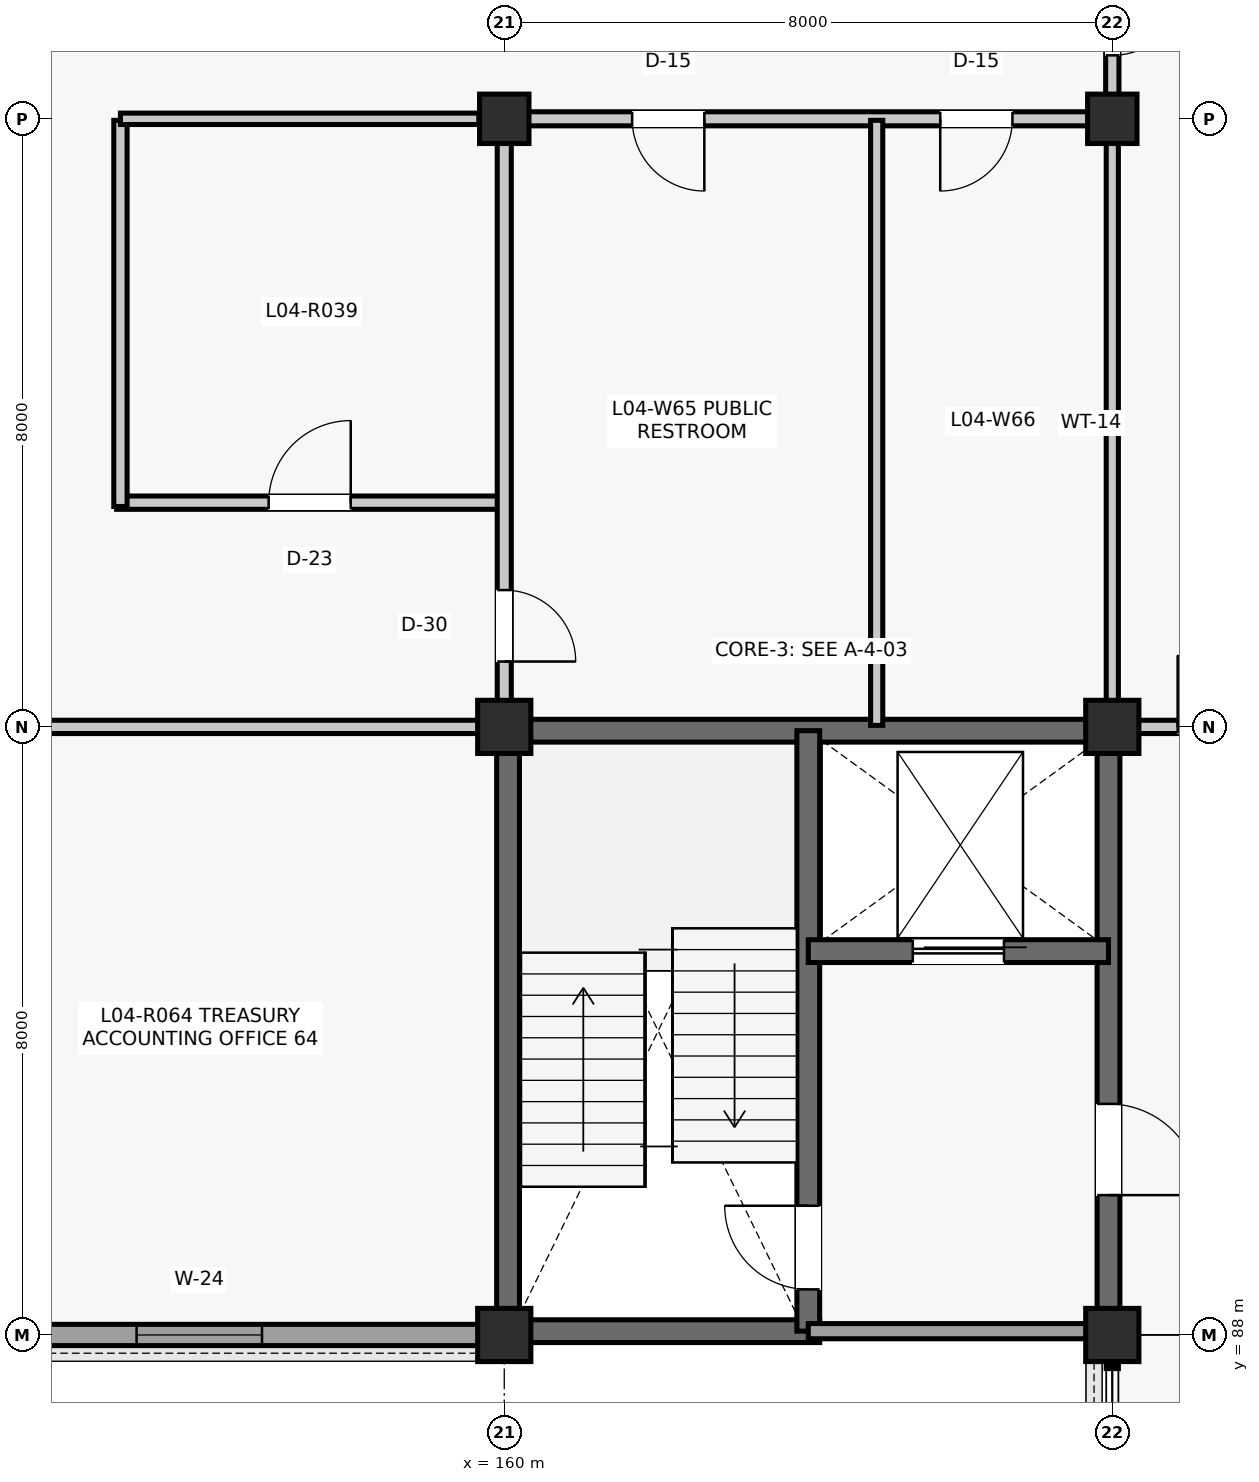
"""IFC4 building model, lengths in metres.
Left out: names, types, materials, properties, quantities, classifications, styles, units other than length and angle.
Written with IfcOpenShell. Run it as: python <this file> out.ifc"""

import sys

from ifc_helpers import new_model, si_unit, direction, frame, frame_2d, origin, origin_2d, place, context, subcontext, project, spatial, rectangle, extrude, element, fill, save


model = new_model("IFC4")
c1 = context("Model", 3, precision=1e-05, world=origin(), true_north=direction((0.0, 1.0)))
c2 = subcontext(c1, "Body", "Model", "MODEL_VIEW")
j1 = project(units=[si_unit("LENGTHUNIT", "METRE"), si_unit("PLANEANGLEUNIT", "RADIAN")], contexts=[c1])
p1 = place(None, origin())
s1 = spatial("IfcSite", under=j1, at=p1, CompositionType="ELEMENT")
p2 = place(p1, origin())
s2 = spatial("IfcBuilding", under=s1, at=p2, CompositionType="ELEMENT")
p3 = place(p2, frame((0.0, 0.0, 17.82)))
s3 = spatial("IfcBuildingStorey", under=s2, at=p3, CompositionType="ELEMENT", Elevation=17.82)
for number, where, z_axis, x_axis in (
    (1, (160.0, 88.0, 0.0), (0.0, 0.0, 1.0), (1.0, 0.0, 0.0)),
    (2, (160.0, 96.0, 0.0), (0.0, 0.0, 1.0), (1.0, 0.0, 0.0)),
):
    element("IfcColumn", number, at=place(p3, frame(where, z_axis=z_axis, x_axis=x_axis)), inside=s3, PredefinedType="COLUMN", context=c2, shape_type="SweptSolid", body=[
        extrude(rectangle(XDim=0.7, YDim=0.7, at=origin_2d()), origin(), (0.0, 0.0, 1.0), 3.96),
    ])
p4 = place(p3, frame((160.0, 104.0, 0.0), z_axis=(0.0, 0.0, 1.0), x_axis=(1.0, 0.0, 0.0)))
e3 = element("IfcColumn", 3, at=p4, inside=s3, PredefinedType="COLUMN", context=c2, shape_type="SweptSolid", body=[
    extrude(rectangle(XDim=0.65, YDim=0.65, at=origin_2d()), origin(), (0.0, 0.0, 1.0), 3.96),
])
for number, where, z_axis, x_axis in (
    (4, (168.0, 88.0, 0.0), (0.0, 0.0, 1.0), (1.0, 0.0, 0.0)),
    (5, (168.0, 96.0, 0.0), (0.0, 0.0, 1.0), (1.0, 0.0, 0.0)),
):
    element("IfcColumn", number, at=place(p3, frame(where, z_axis=z_axis, x_axis=x_axis)), inside=s3, PredefinedType="COLUMN", context=c2, shape_type="SweptSolid", body=[
        extrude(rectangle(XDim=0.7, YDim=0.7, at=origin_2d()), origin(), (0.0, 0.0, 1.0), 3.96),
    ])
p5 = place(p3, frame((168.0, 104.0, 0.0), z_axis=(0.0, 0.0, 1.0), x_axis=(1.0, 0.0, 0.0)))
e6 = element("IfcColumn", 6, at=p5, inside=s3, PredefinedType="COLUMN", context=c2, shape_type="SweptSolid", body=[
    extrude(rectangle(XDim=0.65, YDim=0.65, at=origin_2d()), origin(), (0.0, 0.0, 1.0), 3.96),
])
p6 = place(p3, frame((152.31, 88.0, 0.0), z_axis=(0.0, 0.0, 1.0), x_axis=(1.0, 0.0, 0.0)))
e7 = element("IfcWall", 7, at=p6, inside=s3, PredefinedType="SOLIDWALL", context=c2, shape_type="SweptSolid", body=[
    extrude(rectangle(XDim=7.355, YDim=0.28, at=frame_2d((3.677, 0.0))), origin(), (0.0, 0.0, 1.0), 3.314),
])
p7 = place(p6, frame((2.853, 0.0, 0.9)))
e8 = element("IfcOpeningElement", 8, at=p7, cuts=e7, PredefinedType="OPENING", context=c2, shape_type="SweptSolid", body=[
    extrude(rectangle(XDim=1.65, YDim=1.75, at=frame_2d((0.825, 0.875))), frame((0.0, 0.15, 0.0), z_axis=(0.0, -1.0, 0.0), x_axis=(1.0, 0.0, 0.0)), (0.0, 0.0, 1.0), 0.3),
])
p8 = place(p3, frame((160.05, 88.24, 0.0), z_axis=(0.0, 0.0, 1.0), x_axis=(0.0, 1.0, 0.0)))
e9 = element("IfcWall", 9, at=p8, inside=s3, PredefinedType="SHEAR", context=c2, shape_type="SweptSolid", body=[
    extrude(rectangle(XDim=7.52, YDim=0.3, at=frame_2d((3.76, 0.0))), origin(), (0.0, 0.0, 1.0), 3.263),
])
p9 = place(p3, frame((160.24, 95.95, 0.0), z_axis=(0.0, 0.0, 1.0), x_axis=(1.0, 0.0, 0.0)))
e10 = element("IfcWall", 10, at=p9, inside=s3, PredefinedType="SHEAR", context=c2, shape_type="SweptSolid", body=[
    extrude(rectangle(XDim=7.52, YDim=0.3, at=frame_2d((3.76, 0.0))), origin(), (0.0, 0.0, 1.0), 3.257),
])
p10 = place(p3, frame((167.95, 88.24, 0.0), z_axis=(0.0, 0.0, 1.0), x_axis=(0.0, 1.0, 0.0)))
e11 = element("IfcWall", 11, at=p10, inside=s3, PredefinedType="SHEAR", context=c2, shape_type="SweptSolid", body=[
    extrude(rectangle(XDim=7.52, YDim=0.3, at=frame_2d((3.76, 0.0))), origin(), (0.0, 0.0, 1.0), 3.462),
])
p11 = place(p10, frame((1.6, 0.0, 0.0)))
e12 = element("IfcOpeningElement", 12, at=p11, cuts=e11, PredefinedType="OPENING", context=c2, shape_type="SweptSolid", body=[
    extrude(rectangle(XDim=1.2, YDim=2.15, at=frame_2d((0.6, 1.075))), frame((0.0, 0.16, 0.0), z_axis=(0.0, -1.0, 0.0), x_axis=(1.0, 0.0, 0.0)), (0.0, 0.0, 1.0), 0.32),
])
p12 = place(p3, frame((160.24, 88.05, 0.0), z_axis=(0.0, 0.0, 1.0), x_axis=(1.0, 0.0, 0.0)))
e13 = element("IfcWall", 13, at=p12, inside=s3, PredefinedType="SHEAR", context=c2, shape_type="SweptSolid", body=[
    extrude(rectangle(XDim=3.91, YDim=0.3, at=frame_2d((1.955, 0.0))), origin(), (0.0, 0.0, 1.0), 3.37),
])
p13 = place(p3, frame((164.0, 88.05, 0.0), z_axis=(0.0, 0.0, 1.0), x_axis=(0.0, 1.0, 0.0)))
e14 = element("IfcWall", 14, at=p13, inside=s3, PredefinedType="SHEAR", context=c2, shape_type="SweptSolid", body=[
    extrude(rectangle(XDim=7.9, YDim=0.3, at=frame_2d((3.95, 0.0))), origin(), (0.0, 0.0, 1.0), 3.257),
])
p14 = place(p13, frame((0.55, 0.0, 0.0)))
e15 = element("IfcOpeningElement", 15, at=p14, cuts=e14, PredefinedType="OPENING", context=c2, shape_type="SweptSolid", body=[
    extrude(rectangle(XDim=1.1, YDim=2.15, at=frame_2d((0.55, 1.075))), frame((0.0, 0.16, 0.0), z_axis=(0.0, -1.0, 0.0), x_axis=(1.0, 0.0, 0.0)), (0.0, 0.0, 1.0), 0.32),
])
p15 = place(p3, frame((164.0, 93.05, 0.0), z_axis=(0.0, 0.0, 1.0), x_axis=(1.0, 0.0, 0.0)))
e16 = element("IfcWall", 16, at=p15, inside=s3, PredefinedType="SHEAR", context=c2, shape_type="SweptSolid", body=[
    extrude(rectangle(XDim=3.95, YDim=0.3, at=frame_2d((1.975, 0.0))), origin(), (0.0, 0.0, 1.0), 3.735),
])
p16 = place(p15, frame((1.375, 0.0, 0.0)))
e17 = element("IfcOpeningElement", 17, at=p16, cuts=e16, PredefinedType="OPENING", context=c2, shape_type="SweptSolid", body=[
    extrude(rectangle(XDim=1.2, YDim=2.2, at=frame_2d((0.6, 1.1))), frame((0.0, 0.16, 0.0), z_axis=(0.0, -1.0, 0.0), x_axis=(1.0, 0.0, 0.0)), (0.0, 0.0, 1.0), 0.32),
])
p17 = place(p3, frame((164.0, 88.05, 0.0), z_axis=(0.0, 0.0, 1.0), x_axis=(1.0, 0.0, 0.0)))
e18 = element("IfcWall", 18, at=p17, inside=s3, PredefinedType="PARTITIONING", context=c2, shape_type="SweptSolid", body=[
    extrude(rectangle(XDim=3.66, YDim=0.2, at=frame_2d((1.83, 0.0))), origin(), (0.0, 0.0, 1.0), 3.37),
])
p18 = place(p3, frame((154.9, 98.95, 0.0), z_axis=(0.0, 0.0, 1.0), x_axis=(1.0, 0.0, 0.0)))
e19 = element("IfcWall", 19, at=p18, inside=s3, PredefinedType="PARTITIONING", context=c2, shape_type="SweptSolid", body=[
    extrude(rectangle(XDim=5.08, YDim=0.175, at=frame_2d((2.54, 0.0))), origin(), (0.0, 0.0, 1.0), 3.462),
])
p19 = place(p18, frame((2.0, 0.0, 0.0)))
e20 = element("IfcOpeningElement", 20, at=p19, cuts=e19, PredefinedType="OPENING", context=c2, shape_type="SweptSolid", body=[
    extrude(rectangle(XDim=1.08, YDim=2.2, at=frame_2d((0.54, 1.1))), frame((0.0, 0.097, 0.0), z_axis=(0.0, -1.0, 0.0), x_axis=(1.0, 0.0, 0.0)), (0.0, 0.0, 1.0), 0.195),
])
p20 = place(p3, frame((154.95, 98.9, 0.0), z_axis=(0.0, 0.0, 1.0), x_axis=(0.0, 1.0, 0.0)))
e21 = element("IfcWall", 21, at=p20, inside=s3, PredefinedType="PARTITIONING", context=c2, shape_type="SweptSolid", body=[
    extrude(rectangle(XDim=5.08, YDim=0.175, at=frame_2d((2.54, 0.0))), origin(), (0.0, 0.0, 1.0), 3.232),
])
p21 = place(p3, frame((154.95, 104.0, 0.0), z_axis=(0.0, 0.0, 1.0), x_axis=(1.0, 0.0, 0.0)))
e22 = element("IfcWall", 22, at=p21, inside=s3, PredefinedType="PARTITIONING", context=c2, shape_type="SweptSolid", body=[
    extrude(rectangle(XDim=4.715, YDim=0.15, at=frame_2d((2.357, 0.0))), origin(), (0.0, 0.0, 1.0), 3.232),
])
p22 = place(p3, frame((152.315, 96.0, 0.0), z_axis=(0.0, 0.0, 1.0), x_axis=(1.0, 0.0, 0.0)))
e23 = element("IfcWall", 23, at=p22, inside=s3, PredefinedType="PARTITIONING", context=c2, shape_type="SweptSolid", body=[
    extrude(rectangle(XDim=7.345, YDim=0.175, at=frame_2d((3.672, 0.0))), origin(), (0.0, 0.0, 1.0), 3.462),
])
p23 = place(p3, frame((160.0, 96.34, 0.0), z_axis=(0.0, 0.0, 1.0), x_axis=(0.0, 1.0, 0.0)))
e24 = element("IfcWall", 24, at=p23, inside=s3, PredefinedType="PARTITIONING", context=c2, shape_type="SweptSolid", body=[
    extrude(rectangle(XDim=7.345, YDim=0.185, at=frame_2d((3.672, 0.0))), origin(), (0.0, 0.0, 1.0), 3.462),
])
p24 = place(p23, frame((0.52, 0.0, 0.0)))
e25 = element("IfcOpeningElement", 25, at=p24, cuts=e24, PredefinedType="OPENING", context=c2, shape_type="SweptSolid", body=[
    extrude(rectangle(XDim=0.94, YDim=2.12, at=frame_2d((0.47, 1.06))), frame((0.0, 0.103, 0.0), z_axis=(0.0, -1.0, 0.0), x_axis=(1.0, 0.0, 0.0)), (0.0, 0.0, 1.0), 0.205),
])
p25 = place(p3, frame((168.0, 96.34, 0.0), z_axis=(0.0, 0.0, 1.0), x_axis=(0.0, 1.0, 0.0)))
e26 = element("IfcWall", 26, at=p25, inside=s3, PredefinedType="PARTITIONING", context=c2, shape_type="SweptSolid", body=[
    extrude(rectangle(XDim=7.345, YDim=0.16, at=frame_2d((3.672, 0.0))), origin(), (0.0, 0.0, 1.0), 3.257),
])
p26 = place(p3, frame((160.315, 104.0, 0.0), z_axis=(0.0, 0.0, 1.0), x_axis=(1.0, 0.0, 0.0)))
e27 = element("IfcWall", 27, at=p26, inside=s3, PredefinedType="PARTITIONING", context=c2, shape_type="SweptSolid", body=[
    extrude(rectangle(XDim=7.37, YDim=0.185, at=frame_2d((3.685, 0.0))), origin(), (0.0, 0.0, 1.0), 3.263),
])
p27 = place(p26, frame((1.367, 0.0, 0.0)))
e28 = element("IfcOpeningElement", 28, at=p27, cuts=e27, PredefinedType="OPENING", context=c2, shape_type="SweptSolid", body=[
    extrude(rectangle(XDim=0.95, YDim=2.1, at=frame_2d((0.475, 1.05))), frame((0.0, 0.103, 0.0), z_axis=(0.0, -1.0, 0.0), x_axis=(1.0, 0.0, 0.0)), (0.0, 0.0, 1.0), 0.205),
])
p28 = place(p26, frame((5.421, 0.0, 0.0)))
e29 = element("IfcOpeningElement", 29, at=p28, cuts=e27, PredefinedType="OPENING", context=c2, shape_type="SweptSolid", body=[
    extrude(rectangle(XDim=0.95, YDim=2.1, at=frame_2d((0.475, 1.05))), frame((0.0, 0.103, 0.0), z_axis=(0.0, -1.0, 0.0), x_axis=(1.0, 0.0, 0.0)), (0.0, 0.0, 1.0), 0.205),
])
p29 = place(p3, frame((168.0, 104.315, 0.0), z_axis=(0.0, 0.0, 1.0), x_axis=(0.0, 1.0, 0.0)))
e30 = element("IfcWall", 30, at=p29, inside=s3, PredefinedType="PARTITIONING", context=c2, shape_type="SweptSolid", body=[
    extrude(rectangle(XDim=7.37, YDim=0.175, at=frame_2d((3.685, 0.0))), origin(), (0.0, 0.0, 1.0), 3.263),
])
p30 = place(p29, frame((0.52, 0.0, 0.0)))
e31 = element("IfcOpeningElement", 31, at=p30, cuts=e30, PredefinedType="OPENING", context=c2, shape_type="SweptSolid", body=[
    extrude(rectangle(XDim=0.94, YDim=2.12, at=frame_2d((0.47, 1.06))), frame((0.0, 0.097, 0.0), z_axis=(0.0, -1.0, 0.0), x_axis=(1.0, 0.0, 0.0)), (0.0, 0.0, 1.0), 0.195),
])
p31 = place(p3, frame((168.34, 96.0, 0.0), z_axis=(0.0, 0.0, 1.0), x_axis=(1.0, 0.0, 0.0)))
e32 = element("IfcWall", 32, at=p31, inside=s3, PredefinedType="PARTITIONING", context=c2, shape_type="SweptSolid", body=[
    extrude(rectangle(XDim=7.345, YDim=0.175, at=frame_2d((3.672, 0.0))), origin(), (0.0, 0.0, 1.0), 3.263),
])
p32 = place(p31, frame((0.52, 0.0, 0.0)))
e33 = element("IfcOpeningElement", 33, at=p32, cuts=e32, PredefinedType="OPENING", context=c2, shape_type="SweptSolid", body=[
    extrude(rectangle(XDim=0.94, YDim=2.12, at=frame_2d((0.47, 1.06))), frame((0.0, 0.097, 0.0), z_axis=(0.0, -1.0, 0.0), x_axis=(1.0, 0.0, 0.0)), (0.0, 0.0, 1.0), 0.195),
])
p33 = place(p3, frame((164.9, 96.02, 0.0), z_axis=(0.0, 0.0, 1.0), x_axis=(0.0, 1.0, 0.0)))
e34 = element("IfcWall", 34, at=p33, inside=s3, PredefinedType="PARTITIONING", context=c2, shape_type="SweptSolid", body=[
    extrude(rectangle(XDim=7.96, YDim=0.16, at=frame_2d((3.98, 0.0))), origin(), (0.0, 0.0, 1.0), 3.257),
])
p34 = place(p7, origin())
e35 = element("IfcWindow", 35, at=p34, inside=s3, PartitioningType="SINGLE_PANEL", PredefinedType="WINDOW", context=c2, shape_type="SweptSolid", body=[
    extrude(rectangle(XDim=1.65, YDim=1.75, at=frame_2d((0.825, 0.875))), frame((0.0, 0.03, 0.0), z_axis=(0.0, -1.0, 0.0), x_axis=(1.0, 0.0, 0.0)), (0.0, 0.0, 1.0), 0.06),
])
fill(e8, e35)
p35 = place(p14, origin())
e36 = element("IfcDoor", 36, at=p35, inside=s3, OperationType="SINGLE_SWING_RIGHT", PredefinedType="DOOR", context=c2, shape_type="SweptSolid", body=[
    extrude(rectangle(XDim=1.1, YDim=2.15, at=frame_2d((0.55, 1.075))), frame((0.0, 0.025, 0.0), z_axis=(0.0, -1.0, 0.0), x_axis=(1.0, 0.0, 0.0)), (0.0, 0.0, 1.0), 0.05),
])
fill(e15, e36)
p36 = place(p16, origin())
e37 = element("IfcDoor", 37, at=p36, inside=s3, OperationType="SLIDING_TO_LEFT", PredefinedType="DOOR", context=c2, shape_type="SweptSolid", body=[
    extrude(rectangle(XDim=1.2, YDim=2.2, at=frame_2d((0.6, 1.1))), frame((0.0, 0.025, 0.0), z_axis=(0.0, -1.0, 0.0), x_axis=(1.0, 0.0, 0.0)), (0.0, 0.0, 1.0), 0.05),
])
fill(e17, e37)
p37 = place(p11, frame((1.2, 0.0, 0.0), z_axis=(0.0, 0.0, 1.0), x_axis=(-1.0, 0.0, 0.0)))
e38 = element("IfcDoor", 38, at=p37, inside=s3, OperationType="SINGLE_SWING_LEFT", PredefinedType="DOOR", context=c2, shape_type="SweptSolid", body=[
    extrude(rectangle(XDim=1.2, YDim=2.15, at=frame_2d((0.6, 1.075))), frame((0.0, 0.025, 0.0), z_axis=(0.0, -1.0, 0.0), x_axis=(1.0, 0.0, 0.0)), (0.0, 0.0, 1.0), 0.05),
])
fill(e12, e38)
p38 = place(p19, origin())
e39 = element("IfcDoor", 39, at=p38, inside=s3, OperationType="SINGLE_SWING_RIGHT", PredefinedType="DOOR", context=c2, shape_type="SweptSolid", body=[
    extrude(rectangle(XDim=1.08, YDim=2.2, at=frame_2d((0.54, 1.1))), frame((0.0, 0.025, 0.0), z_axis=(0.0, -1.0, 0.0), x_axis=(1.0, 0.0, 0.0)), (0.0, 0.0, 1.0), 0.05),
])
fill(e20, e39)
p39 = place(p24, frame((0.94, 0.0, 0.0), z_axis=(0.0, 0.0, 1.0), x_axis=(-1.0, 0.0, 0.0)))
e40 = element("IfcDoor", 40, at=p39, inside=s3, OperationType="SINGLE_SWING_LEFT", PredefinedType="DOOR", context=c2, shape_type="SweptSolid", body=[
    extrude(rectangle(XDim=0.94, YDim=2.12, at=frame_2d((0.47, 1.06))), frame((0.0, 0.025, 0.0), z_axis=(0.0, -1.0, 0.0), x_axis=(1.0, 0.0, 0.0)), (0.0, 0.0, 1.0), 0.05),
])
fill(e25, e40)
p40 = place(p27, frame((0.95, 0.0, 0.0), z_axis=(0.0, 0.0, 1.0), x_axis=(-1.0, 0.0, 0.0)))
e41 = element("IfcDoor", 41, at=p40, inside=s3, OperationType="SINGLE_SWING_RIGHT", PredefinedType="DOOR", context=c2, shape_type="SweptSolid", body=[
    extrude(rectangle(XDim=0.95, YDim=2.1, at=frame_2d((0.475, 1.05))), frame((0.0, 0.025, 0.0), z_axis=(0.0, -1.0, 0.0), x_axis=(1.0, 0.0, 0.0)), (0.0, 0.0, 1.0), 0.05),
])
fill(e28, e41)
p41 = place(p28, frame((0.95, 0.0, 0.0), z_axis=(0.0, 0.0, 1.0), x_axis=(-1.0, 0.0, 0.0)))
e42 = element("IfcDoor", 42, at=p41, inside=s3, OperationType="SINGLE_SWING_LEFT", PredefinedType="DOOR", context=c2, shape_type="SweptSolid", body=[
    extrude(rectangle(XDim=0.95, YDim=2.1, at=frame_2d((0.475, 1.05))), frame((0.0, 0.025, 0.0), z_axis=(0.0, -1.0, 0.0), x_axis=(1.0, 0.0, 0.0)), (0.0, 0.0, 1.0), 0.05),
])
fill(e29, e42)
p42 = place(p30, frame((0.94, 0.0, 0.0), z_axis=(0.0, 0.0, 1.0), x_axis=(-1.0, 0.0, 0.0)))
e43 = element("IfcDoor", 43, at=p42, inside=s3, OperationType="SINGLE_SWING_RIGHT", PredefinedType="DOOR", context=c2, shape_type="SweptSolid", body=[
    extrude(rectangle(XDim=0.94, YDim=2.12, at=frame_2d((0.47, 1.06))), frame((0.0, 0.025, 0.0), z_axis=(0.0, -1.0, 0.0), x_axis=(1.0, 0.0, 0.0)), (0.0, 0.0, 1.0), 0.05),
])
fill(e31, e43)
p43 = place(p32, origin())
e44 = element("IfcDoor", 44, at=p43, inside=s3, OperationType="SINGLE_SWING_LEFT", PredefinedType="DOOR", context=c2, shape_type="SweptSolid", body=[
    extrude(rectangle(XDim=0.94, YDim=2.12, at=frame_2d((0.47, 1.06))), frame((0.0, 0.025, 0.0), z_axis=(0.0, -1.0, 0.0), x_axis=(1.0, 0.0, 0.0)), (0.0, 0.0, 1.0), 0.05),
])
fill(e33, e44)
save(model, sys.argv[1])
